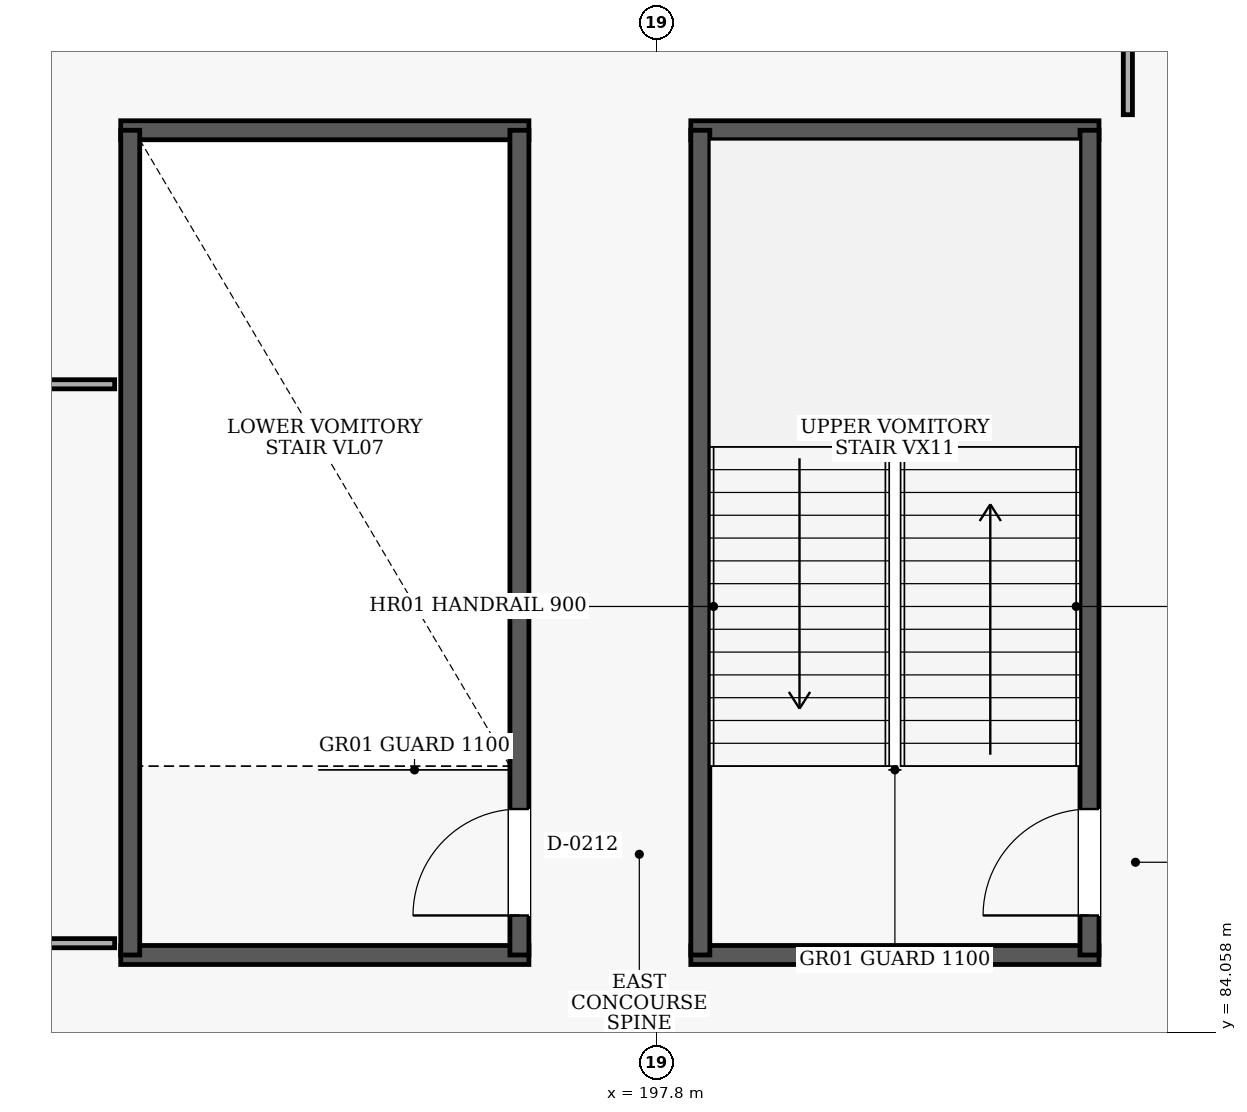
"""IFC4 building model, lengths in metres.
Left out: names, types, materials, properties, quantities, classifications, styles, units other than length and angle.
Written with IfcOpenShell. Run it as: python <this file> out.ifc"""

import sys

from ifc_helpers import new_model, si_unit, direction, frame, frame_2d, origin, place, context, subcontext, project, spatial, rectangle, extrude, element, fill, save


model = new_model("IFC4")
c1 = context("Model", 3, precision=1e-05, world=origin(), true_north=direction((0.0, 1.0)))
c2 = subcontext(c1, "Body", "Model", "MODEL_VIEW")
j1 = project(units=[si_unit("LENGTHUNIT", "METRE"), si_unit("PLANEANGLEUNIT", "RADIAN")], contexts=[c1])
p1 = place(None, origin())
s1 = spatial("IfcSite", under=j1, at=p1, CompositionType="ELEMENT")
p2 = place(p1, origin())
s2 = spatial("IfcBuilding", under=s1, at=p2, CompositionType="ELEMENT")
p3 = place(p2, frame((0.0, 0.0, 5.4)))
s3 = spatial("IfcBuildingStorey", under=s2, at=p3, CompositionType="ELEMENT", Elevation=5.4)
for number, where, z_axis, x_axis in (
    (1, (198.25, 85.075, 0.0), (0.0, 0.0, 1.0), (1.0, 0.0, 0.0)),
    (2, (203.62, 95.925, 0.0), (0.0, 0.0, 1.0), (-1.0, 0.0, 0.0)),
):
    element("IfcWall", number, at=place(p3, frame(where, z_axis=z_axis, x_axis=x_axis)), inside=s3, PredefinedType="SHEAR", context=c2, shape_type="SweptSolid", body=[
        extrude(rectangle(XDim=5.37, YDim=0.25, at=frame_2d((2.685, 0.0))), origin(), (0.0, 0.0, 1.0), 4.5),
    ])
p4 = place(p3, frame((198.375, 85.075, 0.0), z_axis=(0.0, 0.0, 1.0), x_axis=(0.0, 1.0, 0.0)))
e3 = element("IfcWall", 3, at=p4, inside=s3, PredefinedType="SHEAR", context=c2, shape_type="SweptSolid", body=[
    extrude(rectangle(XDim=10.85, YDim=0.25, at=frame_2d((5.425, 0.0))), origin(), (0.0, 0.0, 1.0), 4.5),
])
p5 = place(p3, frame((203.495, 85.075, 0.0), z_axis=(0.0, 0.0, 1.0), x_axis=(0.0, 1.0, 0.0)))
e4 = element("IfcWall", 4, at=p5, inside=s3, PredefinedType="SHEAR", context=c2, shape_type="SweptSolid", body=[
    extrude(rectangle(XDim=10.85, YDim=0.25, at=frame_2d((5.425, 0.0))), origin(), (0.0, 0.0, 1.0), 4.5),
])
p6 = place(p5, frame((0.52, 0.0, 0.0)))
e5 = element("IfcOpeningElement", 5, at=p6, cuts=e4, PredefinedType="OPENING", context=c2, shape_type="SweptSolid", body=[
    extrude(rectangle(XDim=1.4, YDim=2.15, at=frame_2d((0.7, 1.075))), frame((0.0, 0.135, 0.0), z_axis=(0.0, -1.0, 0.0), x_axis=(1.0, 0.0, 0.0)), (0.0, 0.0, 1.0), 0.27),
])
for number, where, z_axis, x_axis in (
    (6, (190.75, 85.075, 0.0), (0.0, 0.0, 1.0), (1.0, 0.0, 0.0)),
    (7, (196.12, 95.925, 0.0), (0.0, 0.0, 1.0), (-1.0, 0.0, 0.0)),
):
    element("IfcWall", number, at=place(p3, frame(where, z_axis=z_axis, x_axis=x_axis)), inside=s3, PredefinedType="SHEAR", context=c2, shape_type="SweptSolid", body=[
        extrude(rectangle(XDim=5.37, YDim=0.25, at=frame_2d((2.685, 0.0))), origin(), (0.0, 0.0, 1.0), 4.5),
    ])
p7 = place(p3, frame((190.875, 85.075, 0.0), z_axis=(0.0, 0.0, 1.0), x_axis=(0.0, 1.0, 0.0)))
e8 = element("IfcWall", 8, at=p7, inside=s3, PredefinedType="SHEAR", context=c2, shape_type="SweptSolid", body=[
    extrude(rectangle(XDim=10.85, YDim=0.25, at=frame_2d((5.425, 0.0))), origin(), (0.0, 0.0, 1.0), 4.5),
])
p8 = place(p3, frame((195.995, 85.075, 0.0), z_axis=(0.0, 0.0, 1.0), x_axis=(0.0, 1.0, 0.0)))
e9 = element("IfcWall", 9, at=p8, inside=s3, PredefinedType="SHEAR", context=c2, shape_type="SweptSolid", body=[
    extrude(rectangle(XDim=10.85, YDim=0.25, at=frame_2d((5.425, 0.0))), origin(), (0.0, 0.0, 1.0), 4.5),
])
p9 = place(p8, frame((0.52, 0.0, 0.0)))
e10 = element("IfcOpeningElement", 10, at=p9, cuts=e9, PredefinedType="OPENING", context=c2, shape_type="SweptSolid", body=[
    extrude(rectangle(XDim=1.4, YDim=2.15, at=frame_2d((0.7, 1.075))), frame((0.0, 0.135, 0.0), z_axis=(0.0, -1.0, 0.0), x_axis=(1.0, 0.0, 0.0)), (0.0, 0.0, 1.0), 0.27),
])
p10 = place(p3, frame((175.6, 85.23, 0.0), z_axis=(0.0, 0.0, 1.0), x_axis=(1.0, 0.0, 0.0)))
e11 = element("IfcWall", 11, at=p10, inside=s3, PredefinedType="PARTITIONING", context=c2, shape_type="SweptSolid", body=[
    extrude(rectangle(XDim=15.07, YDim=0.12, at=frame_2d((7.535, 0.0))), origin(), (0.0, 0.0, 1.0), 4.5),
])
p11 = place(p10, frame((8.035, 0.0, 0.0)))
e12 = element("IfcOpeningElement", 12, at=p11, cuts=e11, PredefinedType="OPENING", context=c2, shape_type="SweptSolid", body=[
    extrude(rectangle(XDim=1.12, YDim=2.15, at=frame_2d((0.56, 1.075))), frame((0.0, 0.07, 0.0), z_axis=(0.0, -1.0, 0.0), x_axis=(1.0, 0.0, 0.0)), (0.0, 0.0, 1.0), 0.14),
])
p12 = place(p3, frame((190.67, 92.583, 0.0), z_axis=(0.0, 0.0, 1.0), x_axis=(-1.0, 0.0, 0.0)))
e13 = element("IfcWall", 13, at=p12, inside=s3, PredefinedType="PARTITIONING", context=c2, shape_type="SweptSolid", body=[
    extrude(rectangle(XDim=15.07, YDim=0.12, at=frame_2d((7.535, 0.0))), origin(), (0.0, 0.0, 1.0), 4.5),
])
p13 = place(p3, frame((204.0, 96.13, 0.0), z_axis=(0.0, 0.0, 1.0), x_axis=(0.0, 1.0, 0.0)))
e14 = element("IfcWall", 14, at=p13, inside=s3, PredefinedType="PARTITIONING", context=c2, shape_type="SweptSolid", body=[
    extrude(rectangle(XDim=3.14, YDim=0.12, at=frame_2d((1.57, 0.0))), origin(), (0.0, 0.0, 1.0), 4.5),
])
p14 = place(p13, frame((0.97, 0.0, 0.0)))
e15 = element("IfcOpeningElement", 15, at=p14, cuts=e14, PredefinedType="OPENING", context=c2, shape_type="SweptSolid", body=[
    extrude(rectangle(XDim=1.2, YDim=2.15, at=frame_2d((0.6, 1.075))), frame((0.0, 0.07, 0.0), z_axis=(0.0, -1.0, 0.0), x_axis=(1.0, 0.0, 0.0)), (0.0, 0.0, 1.0), 0.14),
])
p15 = place(p6, origin())
e16 = element("IfcDoor", 16, at=p15, inside=s3, OperationType="SINGLE_SWING_LEFT", PredefinedType="DOOR", context=c2, shape_type="SweptSolid", body=[
    extrude(rectangle(XDim=1.4, YDim=2.15, at=frame_2d((0.7, 1.075))), frame((0.0, 0.025, 0.0), z_axis=(0.0, -1.0, 0.0), x_axis=(1.0, 0.0, 0.0)), (0.0, 0.0, 1.0), 0.05),
])
fill(e5, e16)
p16 = place(p9, origin())
e17 = element("IfcDoor", 17, at=p16, inside=s3, OperationType="SINGLE_SWING_LEFT", PredefinedType="DOOR", context=c2, shape_type="SweptSolid", body=[
    extrude(rectangle(XDim=1.4, YDim=2.15, at=frame_2d((0.7, 1.075))), frame((0.0, 0.025, 0.0), z_axis=(0.0, -1.0, 0.0), x_axis=(1.0, 0.0, 0.0)), (0.0, 0.0, 1.0), 0.05),
])
fill(e10, e17)
save(model, sys.argv[1])
